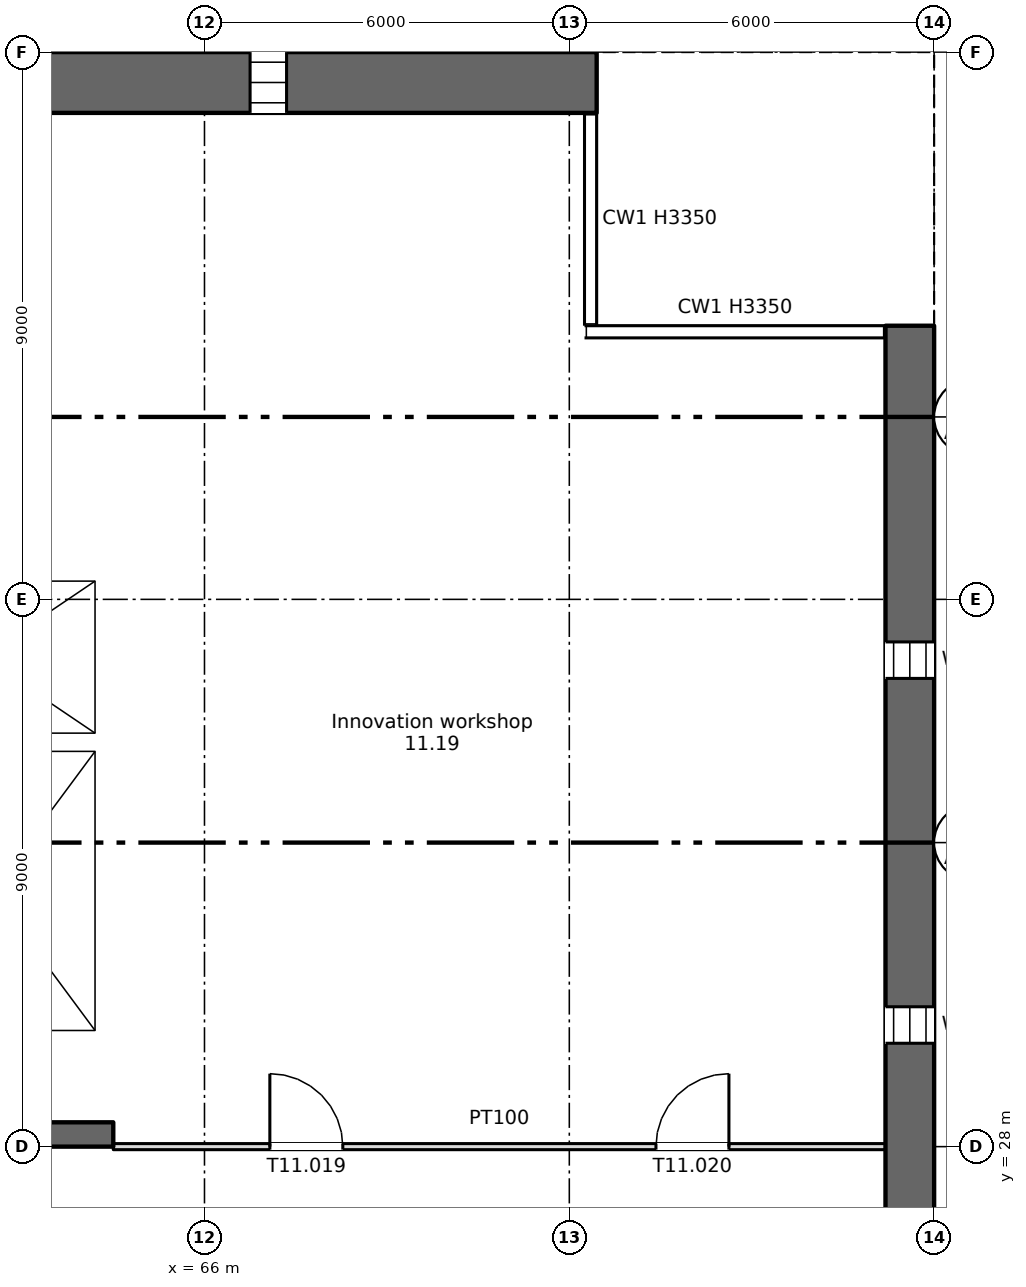
"""IFC4 building model, lengths in metres.
Left out: names, types, materials, properties, quantities, classifications, styles, units other than length and angle.
Written with IfcOpenShell. Run it as: python <this file> out.ifc"""

import sys

from ifc_helpers import new_model, si_unit, direction, frame, frame_2d, origin, place, context, subcontext, project, spatial, rectangle, extrude, element, fill, save


model = new_model("IFC4")
c1 = context("Model", 3, precision=1e-05, world=origin(), true_north=direction((0.0, 1.0)))
c2 = subcontext(c1, "Body", "Model", "MODEL_VIEW")
j1 = project(units=[si_unit("LENGTHUNIT", "METRE"), si_unit("PLANEANGLEUNIT", "RADIAN")], contexts=[c1])
p1 = place(None, origin())
s1 = spatial("IfcSite", under=j1, at=p1, CompositionType="ELEMENT")
p2 = place(p1, origin())
s2 = spatial("IfcBuilding", under=s1, at=p2, CompositionType="ELEMENT")
p3 = place(p2, frame((0.0, 0.0, 56.25)))
s3 = spatial("IfcBuildingStorey", under=s2, at=p3, CompositionType="ELEMENT", Elevation=56.25)
p4 = place(p3, frame((77.6, 4.5, 0.0), z_axis=(0.0, 0.0, 1.0), x_axis=(0.0, 1.0, 0.0)))
e1 = element("IfcWall", 1, at=p4, inside=s3, PredefinedType="SHEAR", context=c2, shape_type="SweptSolid", body=[
    extrude(rectangle(XDim=37.0, YDim=0.8, at=frame_2d((18.5, 0.0))), origin(), (0.0, 0.0, 1.0), 3.35),
])
p5 = place(p4, frame((1.2, 0.0, 0.6)))
e2 = element("IfcOpeningElement", 2, at=p5, cuts=e1, PredefinedType="OPENING", context=c2, shape_type="SweptSolid", body=[
    extrude(rectangle(XDim=0.6, YDim=2.4, at=frame_2d((0.3, 1.2))), frame((0.0, 0.41, 0.0), z_axis=(0.0, -1.0, 0.0), x_axis=(1.0, 0.0, 0.0)), (0.0, 0.0, 1.0), 0.82),
])
p6 = place(p4, frame((7.2, 0.0, 0.6)))
e3 = element("IfcOpeningElement", 3, at=p6, cuts=e1, PredefinedType="OPENING", context=c2, shape_type="SweptSolid", body=[
    extrude(rectangle(XDim=0.6, YDim=2.4, at=frame_2d((0.3, 1.2))), frame((0.0, 0.41, 0.0), z_axis=(0.0, -1.0, 0.0), x_axis=(1.0, 0.0, 0.0)), (0.0, 0.0, 1.0), 0.82),
])
p7 = place(p4, frame((13.2, 0.0, 0.6)))
e4 = element("IfcOpeningElement", 4, at=p7, cuts=e1, PredefinedType="OPENING", context=c2, shape_type="SweptSolid", body=[
    extrude(rectangle(XDim=0.6, YDim=2.4, at=frame_2d((0.3, 1.2))), frame((0.0, 0.41, 0.0), z_axis=(0.0, -1.0, 0.0), x_axis=(1.0, 0.0, 0.0)), (0.0, 0.0, 1.0), 0.82),
])
p8 = place(p4, frame((19.2, 0.0, 0.6)))
e5 = element("IfcOpeningElement", 5, at=p8, cuts=e1, PredefinedType="OPENING", context=c2, shape_type="SweptSolid", body=[
    extrude(rectangle(XDim=0.6, YDim=2.4, at=frame_2d((0.3, 1.2))), frame((0.0, 0.41, 0.0), z_axis=(0.0, -1.0, 0.0), x_axis=(1.0, 0.0, 0.0)), (0.0, 0.0, 1.0), 0.82),
])
p9 = place(p4, frame((25.2, 0.0, 0.6)))
e6 = element("IfcOpeningElement", 6, at=p9, cuts=e1, PredefinedType="OPENING", context=c2, shape_type="SweptSolid", body=[
    extrude(rectangle(XDim=0.6, YDim=2.4, at=frame_2d((0.3, 1.2))), frame((0.0, 0.41, 0.0), z_axis=(0.0, -1.0, 0.0), x_axis=(1.0, 0.0, 0.0)), (0.0, 0.0, 1.0), 0.82),
])
p10 = place(p4, frame((31.2, 0.0, 0.6)))
e7 = element("IfcOpeningElement", 7, at=p10, cuts=e1, PredefinedType="OPENING", context=c2, shape_type="SweptSolid", body=[
    extrude(rectangle(XDim=0.6, YDim=2.4, at=frame_2d((0.3, 1.2))), frame((0.0, 0.41, 0.0), z_axis=(0.0, -1.0, 0.0), x_axis=(1.0, 0.0, 0.0)), (0.0, 0.0, 1.0), 0.82),
])
p11 = place(p3, frame((5.55, 45.5, 0.0), z_axis=(0.0, 0.0, 1.0), x_axis=(1.0, 0.0, 0.0)))
e8 = element("IfcWall", 8, at=p11, inside=s3, PredefinedType="SHEAR", context=c2, shape_type="SweptSolid", body=[
    extrude(rectangle(XDim=66.9, YDim=1.0, at=frame_2d((33.45, 0.0))), origin(), (0.0, 0.0, 1.0), 3.35),
])
p12 = place(p11, frame((1.2, 0.0, 0.6)))
e9 = element("IfcOpeningElement", 9, at=p12, cuts=e8, PredefinedType="OPENING", context=c2, shape_type="SweptSolid", body=[
    extrude(rectangle(XDim=0.6, YDim=2.4, at=frame_2d((0.3, 1.2))), frame((0.0, 0.51, 0.0), z_axis=(0.0, -1.0, 0.0), x_axis=(1.0, 0.0, 0.0)), (0.0, 0.0, 1.0), 1.02),
])
p13 = place(p11, frame((7.2, 0.0, 0.6)))
e10 = element("IfcOpeningElement", 10, at=p13, cuts=e8, PredefinedType="OPENING", context=c2, shape_type="SweptSolid", body=[
    extrude(rectangle(XDim=0.6, YDim=2.4, at=frame_2d((0.3, 1.2))), frame((0.0, 0.51, 0.0), z_axis=(0.0, -1.0, 0.0), x_axis=(1.0, 0.0, 0.0)), (0.0, 0.0, 1.0), 1.02),
])
p14 = place(p11, frame((61.2, 0.0, 0.6)))
e11 = element("IfcOpeningElement", 11, at=p14, cuts=e8, PredefinedType="OPENING", context=c2, shape_type="SweptSolid", body=[
    extrude(rectangle(XDim=0.6, YDim=2.4, at=frame_2d((0.3, 1.2))), frame((0.0, 0.51, 0.0), z_axis=(0.0, -1.0, 0.0), x_axis=(1.0, 0.0, 0.0)), (0.0, 0.0, 1.0), 1.02),
])
p15 = place(p3, frame((6.7, 28.2, 0.0), z_axis=(0.0, 0.0, 1.0), x_axis=(1.0, 0.0, 0.0)))
e12 = element("IfcWall", 12, at=p15, inside=s3, PredefinedType="SHEAR", context=c2, shape_type="SweptSolid", body=[
    extrude(rectangle(XDim=57.8, YDim=0.4, at=frame_2d((28.9, 0.0))), origin(), (0.0, 0.0, 1.0), 3.35),
])
p16 = place(p15, frame((13.85, 0.0, 0.0)))
e13 = element("IfcOpeningElement", 13, at=p16, cuts=e12, PredefinedType="OPENING", context=c2, shape_type="SweptSolid", body=[
    extrude(rectangle(XDim=0.9, YDim=2.1, at=frame_2d((0.45, 1.05))), frame((0.0, 0.21, 0.0), z_axis=(0.0, -1.0, 0.0), x_axis=(1.0, 0.0, 0.0)), (0.0, 0.0, 1.0), 0.42),
])
p17 = place(p15, frame((48.562, 0.0, 0.0)))
e14 = element("IfcOpeningElement", 14, at=p17, cuts=e12, PredefinedType="OPENING", context=c2, shape_type="SweptSolid", body=[
    extrude(rectangle(XDim=0.9, YDim=2.1, at=frame_2d((0.45, 1.05))), frame((0.0, 0.21, 0.0), z_axis=(0.0, -1.0, 0.0), x_axis=(1.0, 0.0, 0.0)), (0.0, 0.0, 1.0), 0.42),
])
p18 = place(p15, frame((51.137, 0.0, 0.0)))
e15 = element("IfcOpeningElement", 15, at=p18, cuts=e12, PredefinedType="OPENING", context=c2, shape_type="SweptSolid", body=[
    extrude(rectangle(XDim=0.9, YDim=2.1, at=frame_2d((0.45, 1.05))), frame((0.0, 0.21, 0.0), z_axis=(0.0, -1.0, 0.0), x_axis=(1.0, 0.0, 0.0)), (0.0, 0.0, 1.0), 0.42),
])
p19 = place(p15, frame((1.35, 0.0, 0.0)))
e16 = element("IfcOpeningElement", 16, at=p19, cuts=e12, PredefinedType="OPENING", context=c2, shape_type="SweptSolid", body=[
    extrude(rectangle(XDim=0.9, YDim=2.1, at=frame_2d((0.45, 1.05))), frame((0.0, 0.21, 0.0), z_axis=(0.0, -1.0, 0.0), x_axis=(1.0, 0.0, 0.0)), (0.0, 0.0, 1.0), 0.42),
])
p20 = place(p15, frame((4.7, 0.0, 0.0)))
e17 = element("IfcOpeningElement", 17, at=p20, cuts=e12, PredefinedType="OPENING", context=c2, shape_type="SweptSolid", body=[
    extrude(rectangle(XDim=1.2, YDim=2.1, at=frame_2d((0.6, 1.05))), frame((0.0, 0.21, 0.0), z_axis=(0.0, -1.0, 0.0), x_axis=(1.0, 0.0, 0.0)), (0.0, 0.0, 1.0), 0.42),
])
p21 = place(p15, frame((31.7, 0.0, 0.0)))
e18 = element("IfcOpeningElement", 18, at=p21, cuts=e12, PredefinedType="OPENING", context=c2, shape_type="SweptSolid", body=[
    extrude(rectangle(XDim=1.2, YDim=2.1, at=frame_2d((0.6, 1.05))), frame((0.0, 0.21, 0.0), z_axis=(0.0, -1.0, 0.0), x_axis=(1.0, 0.0, 0.0)), (0.0, 0.0, 1.0), 0.42),
])
p22 = place(p15, frame((55.2, 0.0, 0.0)))
e19 = element("IfcOpeningElement", 19, at=p22, cuts=e12, PredefinedType="OPENING", context=c2, shape_type="SweptSolid", body=[
    extrude(rectangle(XDim=1.2, YDim=2.1, at=frame_2d((0.6, 1.05))), frame((0.0, 0.21, 0.0), z_axis=(0.0, -1.0, 0.0), x_axis=(1.0, 0.0, 0.0)), (0.0, 0.0, 1.0), 0.42),
])
p23 = place(p15, frame((21.7, 0.0, 0.0)))
e20 = element("IfcOpeningElement", 20, at=p23, cuts=e12, PredefinedType="OPENING", context=c2, shape_type="SweptSolid", body=[
    extrude(rectangle(XDim=1.2, YDim=2.1, at=frame_2d((0.6, 1.05))), frame((0.0, 0.21, 0.0), z_axis=(0.0, -1.0, 0.0), x_axis=(1.0, 0.0, 0.0)), (0.0, 0.0, 1.0), 0.42),
])
p24 = place(p15, frame((41.7, 0.0, 0.0)))
e21 = element("IfcOpeningElement", 21, at=p24, cuts=e12, PredefinedType="OPENING", context=c2, shape_type="SweptSolid", body=[
    extrude(rectangle(XDim=1.2, YDim=2.1, at=frame_2d((0.6, 1.05))), frame((0.0, 0.21, 0.0), z_axis=(0.0, -1.0, 0.0), x_axis=(1.0, 0.0, 0.0)), (0.0, 0.0, 1.0), 0.42),
])
p25 = place(p15, frame((24.85, 0.0, 0.0)))
e22 = element("IfcOpeningElement", 22, at=p25, cuts=e12, PredefinedType="OPENING", context=c2, shape_type="SweptSolid", body=[
    extrude(rectangle(XDim=2.4, YDim=2.1, at=frame_2d((1.2, 1.05))), frame((0.0, 0.21, 0.0), z_axis=(0.0, -1.0, 0.0), x_axis=(1.0, 0.0, 0.0)), (0.0, 0.0, 1.0), 0.42),
])
p26 = place(p15, frame((37.35, 0.0, 0.0)))
e23 = element("IfcOpeningElement", 23, at=p26, cuts=e12, PredefinedType="OPENING", context=c2, shape_type="SweptSolid", body=[
    extrude(rectangle(XDim=2.4, YDim=2.1, at=frame_2d((1.2, 1.05))), frame((0.0, 0.21, 0.0), z_axis=(0.0, -1.0, 0.0), x_axis=(1.0, 0.0, 0.0)), (0.0, 0.0, 1.0), 0.42),
])
p27 = place(p15, frame((7.85, 0.0, 0.0)))
e24 = element("IfcOpeningElement", 24, at=p27, cuts=e12, PredefinedType="OPENING", context=c2, shape_type="SweptSolid", body=[
    extrude(rectangle(XDim=2.4, YDim=2.1, at=frame_2d((1.2, 1.05))), frame((0.0, 0.21, 0.0), z_axis=(0.0, -1.0, 0.0), x_axis=(1.0, 0.0, 0.0)), (0.0, 0.0, 1.0), 0.42),
])
p28 = place(p15, frame((28.85, 0.0, 0.0)))
e25 = element("IfcOpeningElement", 25, at=p28, cuts=e12, PredefinedType="OPENING", context=c2, shape_type="SweptSolid", body=[
    extrude(rectangle(XDim=0.9, YDim=2.1, at=frame_2d((0.45, 1.05))), frame((0.0, 0.21, 0.0), z_axis=(0.0, -1.0, 0.0), x_axis=(1.0, 0.0, 0.0)), (0.0, 0.0, 1.0), 0.42),
])
p29 = place(p15, frame((34.85, 0.0, 0.0)))
e26 = element("IfcOpeningElement", 26, at=p29, cuts=e12, PredefinedType="OPENING", context=c2, shape_type="SweptSolid", body=[
    extrude(rectangle(XDim=0.9, YDim=2.1, at=frame_2d((0.45, 1.05))), frame((0.0, 0.21, 0.0), z_axis=(0.0, -1.0, 0.0), x_axis=(1.0, 0.0, 0.0)), (0.0, 0.0, 1.0), 0.42),
])
p30 = place(p3, frame((64.35, 34.8, 0.0), z_axis=(0.0, 0.0, 1.0), x_axis=(0.0, 1.0, 0.0)))
e27 = element("IfcWall", 27, at=p30, inside=s3, PredefinedType="SHEAR", context=c2, shape_type="SweptSolid", body=[
    extrude(rectangle(XDim=10.2, YDim=0.3, at=frame_2d((5.1, 0.0))), origin(), (0.0, 0.0, 1.0), 3.35),
])
p31 = place(p3, frame((64.35, 28.4, 0.0), z_axis=(0.0, 0.0, 1.0), x_axis=(0.0, 1.0, 0.0)))
e28 = element("IfcWall", 28, at=p31, inside=s3, PredefinedType="SHEAR", context=c2, shape_type="SweptSolid", body=[
    extrude(rectangle(XDim=6.1, YDim=0.3, at=frame_2d((3.05, 0.0))), origin(), (0.0, 0.0, 1.0), 3.35),
])
p32 = place(p3, frame((60.5, 34.65, 0.0), z_axis=(0.0, 0.0, 1.0), x_axis=(1.0, 0.0, 0.0)))
e29 = element("IfcWall", 29, at=p32, inside=s3, PredefinedType="SHEAR", context=c2, shape_type="SweptSolid", body=[
    extrude(rectangle(XDim=4.0, YDim=0.3, at=frame_2d((2.0, 0.0))), origin(), (0.0, 0.0, 1.0), 3.35),
])
p33 = place(p3, frame((60.5, 37.45, 0.0), z_axis=(0.0, 0.0, 1.0), x_axis=(1.0, 0.0, 0.0)))
e30 = element("IfcWall", 30, at=p33, inside=s3, PredefinedType="SHEAR", context=c2, shape_type="SweptSolid", body=[
    extrude(rectangle(XDim=3.7, YDim=0.3, at=frame_2d((1.85, 0.0))), origin(), (0.0, 0.0, 1.0), 3.35),
])
p34 = place(p33, frame((1.3, 0.0, 0.0)))
e31 = element("IfcOpeningElement", 31, at=p34, cuts=e30, PredefinedType="OPENING", context=c2, shape_type="SweptSolid", body=[
    extrude(rectangle(XDim=1.1, YDim=2.1, at=frame_2d((0.55, 1.05))), frame((0.0, 0.16, 0.0), z_axis=(0.0, -1.0, 0.0), x_axis=(1.0, 0.0, 0.0)), (0.0, 0.0, 1.0), 0.32),
])
p35 = place(p3, frame((64.5, 28.0, 0.0), z_axis=(0.0, 0.0, 1.0), x_axis=(1.0, 0.0, 0.0)))
e32 = element("IfcWall", 32, at=p35, inside=s3, PredefinedType="PARTITIONING", context=c2, shape_type="SweptSolid", body=[
    extrude(rectangle(XDim=12.7, YDim=0.1, at=frame_2d((6.35, 0.0))), origin(), (0.0, 0.0, 1.0), 3.35),
])
p36 = place(p35, frame((2.575, 0.0, 0.0)))
e33 = element("IfcOpeningElement", 33, at=p36, cuts=e32, PredefinedType="OPENING", context=c2, shape_type="SweptSolid", body=[
    extrude(rectangle(XDim=1.2, YDim=2.1, at=frame_2d((0.6, 1.05))), frame((0.0, 0.06, 0.0), z_axis=(0.0, -1.0, 0.0), x_axis=(1.0, 0.0, 0.0)), (0.0, 0.0, 1.0), 0.12),
])
p37 = place(p35, frame((8.925, 0.0, 0.0)))
e34 = element("IfcOpeningElement", 34, at=p37, cuts=e32, PredefinedType="OPENING", context=c2, shape_type="SweptSolid", body=[
    extrude(rectangle(XDim=1.2, YDim=2.1, at=frame_2d((0.6, 1.05))), frame((0.0, 0.06, 0.0), z_axis=(0.0, -1.0, 0.0), x_axis=(1.0, 0.0, 0.0)), (0.0, 0.0, 1.0), 0.12),
])
p38 = place(p14, origin())
e35 = element("IfcWindow", 35, at=p38, inside=s3, PartitioningType="SINGLE_PANEL", PredefinedType="WINDOW", context=c2, shape_type="SweptSolid", body=[
    extrude(rectangle(XDim=0.6, YDim=2.4, at=frame_2d((0.3, 1.2))), frame((0.0, 0.03, 0.0), z_axis=(0.0, -1.0, 0.0), x_axis=(1.0, 0.0, 0.0)), (0.0, 0.0, 1.0), 0.06),
])
fill(e11, e35)
p39 = place(p9, origin())
e36 = element("IfcWindow", 36, at=p39, inside=s3, PartitioningType="SINGLE_PANEL", PredefinedType="WINDOW", context=c2, shape_type="SweptSolid", body=[
    extrude(rectangle(XDim=0.6, YDim=2.4, at=frame_2d((0.3, 1.2))), frame((0.0, 0.03, 0.0), z_axis=(0.0, -1.0, 0.0), x_axis=(1.0, 0.0, 0.0)), (0.0, 0.0, 1.0), 0.06),
])
fill(e6, e36)
p40 = place(p10, origin())
e37 = element("IfcWindow", 37, at=p40, inside=s3, PartitioningType="SINGLE_PANEL", PredefinedType="WINDOW", context=c2, shape_type="SweptSolid", body=[
    extrude(rectangle(XDim=0.6, YDim=2.4, at=frame_2d((0.3, 1.2))), frame((0.0, 0.03, 0.0), z_axis=(0.0, -1.0, 0.0), x_axis=(1.0, 0.0, 0.0)), (0.0, 0.0, 1.0), 0.06),
])
fill(e7, e37)
p41 = place(p36, origin())
e38 = element("IfcDoor", 38, at=p41, inside=s3, OperationType="SINGLE_SWING_LEFT", PredefinedType="DOOR", context=c2, shape_type="SweptSolid", body=[
    extrude(rectangle(XDim=1.2, YDim=2.1, at=frame_2d((0.6, 1.05))), frame((0.0, 0.025, 0.0), z_axis=(0.0, -1.0, 0.0), x_axis=(1.0, 0.0, 0.0)), (0.0, 0.0, 1.0), 0.05),
])
fill(e33, e38)
p42 = place(p37, origin())
e39 = element("IfcDoor", 39, at=p42, inside=s3, OperationType="SINGLE_SWING_RIGHT", PredefinedType="DOOR", context=c2, shape_type="SweptSolid", body=[
    extrude(rectangle(XDim=1.2, YDim=2.1, at=frame_2d((0.6, 1.05))), frame((0.0, 0.025, 0.0), z_axis=(0.0, -1.0, 0.0), x_axis=(1.0, 0.0, 0.0)), (0.0, 0.0, 1.0), 0.05),
])
fill(e34, e39)
save(model, sys.argv[1])
